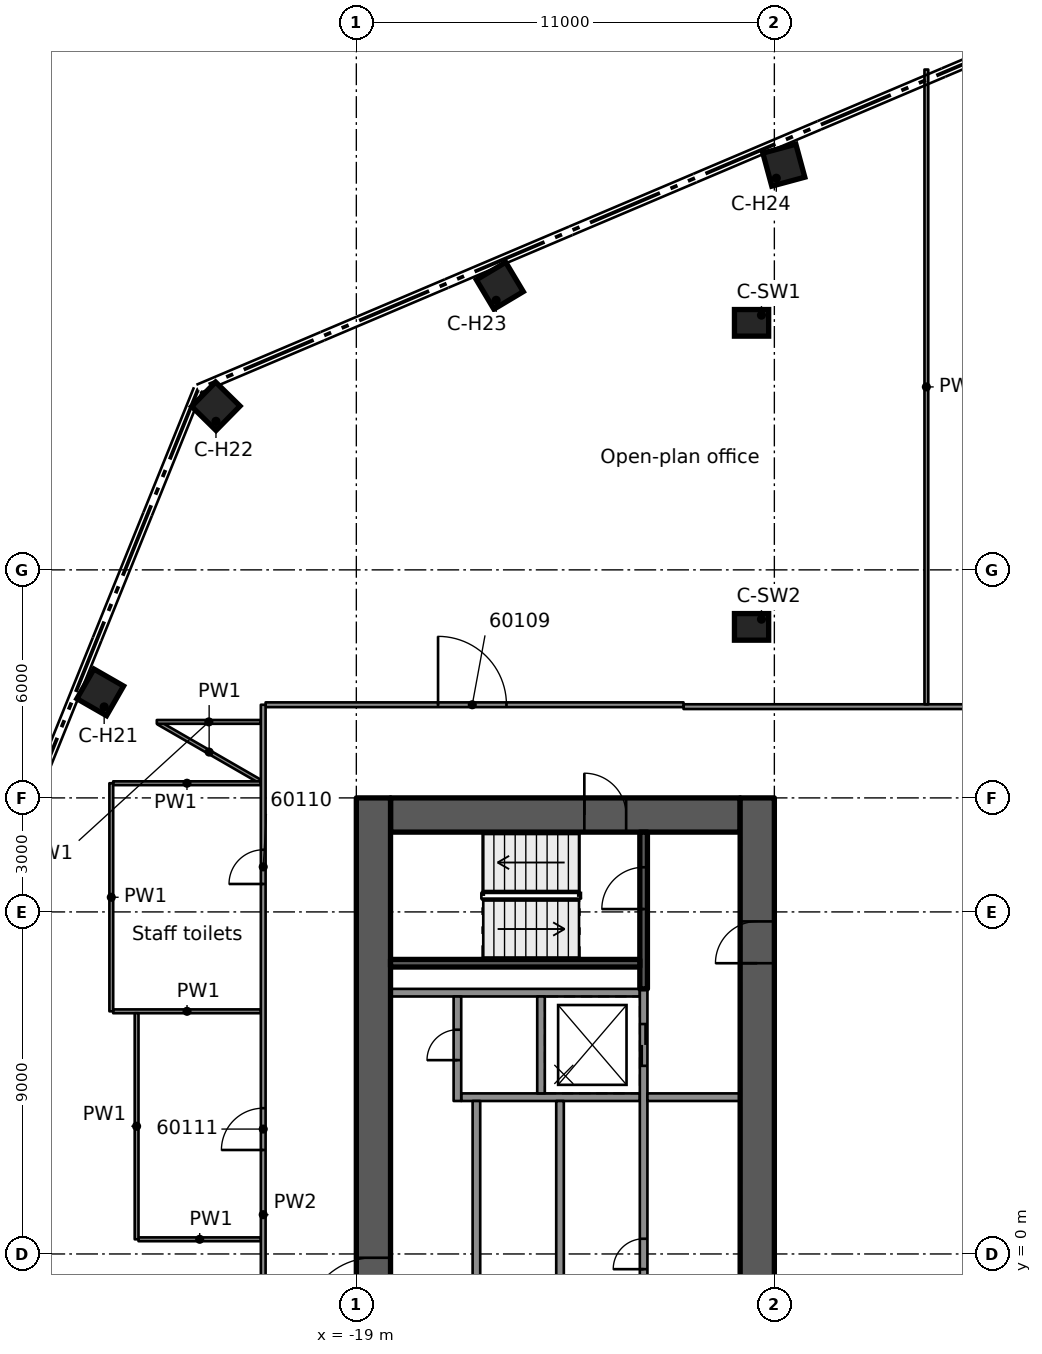
"""IFC4 building model, lengths in metres.
Left out: names, types, materials, properties, quantities, classifications, styles, units other than length and angle.
Written with IfcOpenShell. Run it as: python <this file> out.ifc"""

import sys

from ifc_helpers import new_model, si_unit, direction, frame, frame_2d, origin, origin_2d, place, context, subcontext, project, spatial, rectangle, extrude, element, fill, save


model = new_model("IFC4")
c1 = context("Model", 3, precision=1e-05, world=origin(), true_north=direction((0.0, 1.0)))
c2 = subcontext(c1, "Body", "Model", "MODEL_VIEW")
j1 = project(units=[si_unit("LENGTHUNIT", "METRE"), si_unit("PLANEANGLEUNIT", "RADIAN")], contexts=[c1])
p1 = place(None, origin())
s1 = spatial("IfcSite", under=j1, at=p1, CompositionType="ELEMENT")
p2 = place(p1, origin())
s2 = spatial("IfcBuilding", under=s1, at=p2, CompositionType="ELEMENT")
p3 = place(p2, frame((0.0, 0.0, 292.9)))
s3 = spatial("IfcBuildingStorey", under=s2, at=p3, CompositionType="ELEMENT", Elevation=292.9)
p4 = place(p3, frame((-18.1, 11.55, 0.0), z_axis=(0.0, 0.0, 1.0), x_axis=(1.0, 0.0, 0.0)))
e1 = element("IfcWall", 1, at=p4, inside=s3, PredefinedType="SHEAR", context=c2, shape_type="SweptSolid", body=[
    extrude(rectangle(XDim=9.2, YDim=0.9, at=frame_2d((4.6, 0.0))), origin(), (0.0, 0.0, 1.0), 3.5),
])
p5 = place(p4, frame((5.1, 0.0, 0.0)))
e2 = element("IfcOpeningElement", 2, at=p5, cuts=e1, PredefinedType="OPENING", context=c2, shape_type="SweptSolid", body=[
    extrude(rectangle(XDim=1.1, YDim=2.1, at=frame_2d((0.55, 1.05))), frame((0.0, 0.46, 0.0), z_axis=(0.0, -1.0, 0.0), x_axis=(1.0, 0.0, 0.0)), (0.0, 0.0, 1.0), 0.92),
])
p6 = place(p3, frame((-18.55, -12.0, 0.0), z_axis=(0.0, 0.0, 1.0), x_axis=(0.0, 1.0, 0.0)))
e3 = element("IfcWall", 3, at=p6, inside=s3, PredefinedType="SHEAR", context=c2, shape_type="SweptSolid", body=[
    extrude(rectangle(XDim=24.0, YDim=0.9, at=frame_2d((12.0, 0.0))), origin(), (0.0, 0.0, 1.0), 3.5),
])
p7 = place(p6, frame((10.1, 0.0, 0.0)))
e4 = element("IfcOpeningElement", 4, at=p7, cuts=e3, PredefinedType="OPENING", context=c2, shape_type="SweptSolid", body=[
    extrude(rectangle(XDim=1.8, YDim=2.1, at=frame_2d((0.9, 1.05))), frame((0.0, 0.46, 0.0), z_axis=(0.0, -1.0, 0.0), x_axis=(1.0, 0.0, 0.0)), (0.0, 0.0, 1.0), 0.92),
])
p8 = place(p3, frame((-8.45, -12.0, 0.0), z_axis=(0.0, 0.0, 1.0), x_axis=(0.0, 1.0, 0.0)))
e5 = element("IfcWall", 5, at=p8, inside=s3, PredefinedType="SHEAR", context=c2, shape_type="SweptSolid", body=[
    extrude(rectangle(XDim=24.0, YDim=0.9, at=frame_2d((12.0, 0.0))), origin(), (0.0, 0.0, 1.0), 3.5),
])
p9 = place(p8, frame((9.6, 0.0, 0.0)))
e6 = element("IfcOpeningElement", 6, at=p9, cuts=e5, PredefinedType="OPENING", context=c2, shape_type="SweptSolid", body=[
    extrude(rectangle(XDim=1.8, YDim=2.1, at=frame_2d((0.9, 1.05))), frame((0.0, 0.46, 0.0), z_axis=(0.0, -1.0, 0.0), x_axis=(1.0, 0.0, 0.0)), (0.0, 0.0, 1.0), 0.92),
])
p10 = place(p8, frame((19.65, 0.0, 0.0)))
e7 = element("IfcOpeningElement", 7, at=p10, cuts=e5, PredefinedType="OPENING", context=c2, shape_type="SweptSolid", body=[
    extrude(rectangle(XDim=1.1, YDim=2.1, at=frame_2d((0.55, 1.05))), frame((0.0, 0.46, 0.0), z_axis=(0.0, -1.0, 0.0), x_axis=(1.0, 0.0, 0.0)), (0.0, 0.0, 1.0), 0.92),
])
for number, where, z_axis, x_axis in (
    (8, (-25.739, 14.777, 0.0), (0.0, 0.0, 1.0), (-0.867, 0.498, 0.0)),
    (9, (-22.697, 22.305, 0.0), (0.0, 0.0, 1.0), (-0.713, 0.701, 0.0)),
    (10, (-15.224, 25.477, 0.0), (0.0, 0.0, 1.0), (-0.513, 0.858, 0.0)),
    (11, (-7.751, 28.649, 0.0), (0.0, 0.0, 1.0), (-0.261, 0.965, 0.0)),
):
    element("IfcColumn", number, at=place(p3, frame(where, z_axis=z_axis, x_axis=x_axis)), inside=s3, PredefinedType="COLUMN", context=c2, shape_type="SweptSolid", body=[
        extrude(rectangle(XDim=0.9, YDim=0.9, at=origin_2d()), origin(), (0.0, 0.0, 1.0), 3.5),
    ])
for number, where, z_axis, x_axis in (
    (12, (-8.6, 24.5, 0.0), (0.0, 0.0, 1.0), (1.0, 0.0, 0.0)),
    (13, (-8.6, 16.5, 0.0), (0.0, 0.0, 1.0), (1.0, 0.0, 0.0)),
):
    element("IfcColumn", number, at=place(p3, frame(where, z_axis=z_axis, x_axis=x_axis)), inside=s3, PredefinedType="COLUMN", context=c2, shape_type="SweptSolid", body=[
        extrude(rectangle(XDim=0.9, YDim=0.7, at=origin_2d()), origin(), (0.0, 0.0, 1.0), 3.5),
    ])
p11 = place(p3, frame((-11.54, 6.875, 0.0), z_axis=(0.0, 0.0, 1.0), x_axis=(-1.0, 0.0, 0.0)))
e14 = element("IfcWall", 14, at=p11, inside=s3, PredefinedType="SOLIDWALL", context=c2, shape_type="SweptSolid", body=[
    extrude(rectangle(XDim=6.56, YDim=0.2, at=frame_2d((3.28, 0.0))), origin(), (0.0, 0.0, 1.0), 3.09),
])
p12 = place(p3, frame((-11.54, 4.125, 0.0), z_axis=(0.0, 0.0, 1.0), x_axis=(-1.0, 0.0, 0.0)))
e15 = element("IfcWall", 15, at=p12, inside=s3, PredefinedType="SOLIDWALL", context=c2, shape_type="SweptSolid", body=[
    extrude(rectangle(XDim=4.7, YDim=0.2, at=frame_2d((2.35, 0.0))), origin(), (0.0, 0.0, 1.0), 3.09),
])
p13 = place(p3, frame((-11.44, -6.975, 0.0), z_axis=(0.0, 0.0, 1.0), x_axis=(0.0, 1.0, 0.0)))
e16 = element("IfcWall", 16, at=p13, inside=s3, PredefinedType="SOLIDWALL", context=c2, shape_type="SweptSolid", body=[
    extrude(rectangle(XDim=13.95, YDim=0.2, at=frame_2d((6.975, 0.0))), origin(), (0.0, 0.0, 1.0), 3.09),
])
p14 = place(p13, frame((0.925, 0.0, 0.0)))
e17 = element("IfcOpeningElement", 17, at=p14, cuts=e16, PredefinedType="OPENING", context=c2, shape_type="SweptSolid", body=[
    extrude(rectangle(XDim=1.1, YDim=2.1, at=frame_2d((0.55, 1.05))), frame((0.0, 0.11, 0.0), z_axis=(0.0, -1.0, 0.0), x_axis=(1.0, 0.0, 0.0)), (0.0, 0.0, 1.0), 0.22),
])
p15 = place(p13, frame((3.675, 0.0, 0.0)))
e18 = element("IfcOpeningElement", 18, at=p15, cuts=e16, PredefinedType="OPENING", context=c2, shape_type="SweptSolid", body=[
    extrude(rectangle(XDim=1.1, YDim=2.1, at=frame_2d((0.55, 1.05))), frame((0.0, 0.11, 0.0), z_axis=(0.0, -1.0, 0.0), x_axis=(1.0, 0.0, 0.0)), (0.0, 0.0, 1.0), 0.22),
])
p16 = place(p13, frame((11.925, 0.0, 0.0)))
e19 = element("IfcOpeningElement", 19, at=p16, cuts=e16, PredefinedType="OPENING", context=c2, shape_type="SweptSolid", body=[
    extrude(rectangle(XDim=1.1, YDim=2.1, at=frame_2d((0.55, 1.05))), frame((0.0, 0.11, 0.0), z_axis=(0.0, -1.0, 0.0), x_axis=(1.0, 0.0, 0.0)), (0.0, 0.0, 1.0), 0.22),
])
p17 = place(p13, frame((6.575, 0.0, 0.0)))
e20 = element("IfcOpeningElement", 20, at=p17, cuts=e16, PredefinedType="OPENING", context=c2, shape_type="SweptSolid", body=[
    extrude(rectangle(XDim=0.8, YDim=2.1, at=frame_2d((0.4, 1.05))), frame((0.0, 0.11, 0.0), z_axis=(0.0, -1.0, 0.0), x_axis=(1.0, 0.0, 0.0)), (0.0, 0.0, 1.0), 0.22),
])
p18 = place(p3, frame((-13.64, -4.025, 0.0), z_axis=(0.0, 0.0, 1.0), x_axis=(0.0, 1.0, 0.0)))
e21 = element("IfcWall", 21, at=p18, inside=s3, PredefinedType="SOLIDWALL", context=c2, shape_type="SweptSolid", body=[
    extrude(rectangle(XDim=8.05, YDim=0.2, at=frame_2d((4.025, 0.0))), origin(), (0.0, 0.0, 1.0), 3.09),
])
p19 = place(p3, frame((-14.14, 4.225, 0.0), z_axis=(0.0, 0.0, 1.0), x_axis=(0.0, 1.0, 0.0)))
e22 = element("IfcWall", 22, at=p19, inside=s3, PredefinedType="SOLIDWALL", context=c2, shape_type="SweptSolid", body=[
    extrude(rectangle(XDim=2.55, YDim=0.2, at=frame_2d((1.275, 0.0))), origin(), (0.0, 0.0, 1.0), 3.09),
])
p20 = place(p3, frame((-15.84, -4.025, 0.0), z_axis=(0.0, 0.0, 1.0), x_axis=(0.0, 1.0, 0.0)))
e23 = element("IfcWall", 23, at=p20, inside=s3, PredefinedType="SOLIDWALL", context=c2, shape_type="SweptSolid", body=[
    extrude(rectangle(XDim=8.05, YDim=0.2, at=frame_2d((4.025, 0.0))), origin(), (0.0, 0.0, 1.0), 3.09),
])
p21 = place(p20, frame((0.875, 0.0, 0.0)))
e24 = element("IfcOpeningElement", 24, at=p21, cuts=e23, PredefinedType="OPENING", context=c2, shape_type="SweptSolid", body=[
    extrude(rectangle(XDim=0.8, YDim=2.1, at=frame_2d((0.4, 1.05))), frame((0.0, 0.11, 0.0), z_axis=(0.0, -1.0, 0.0), x_axis=(1.0, 0.0, 0.0)), (0.0, 0.0, 1.0), 0.22),
])
p22 = place(p3, frame((-16.34, 4.025, 0.0), z_axis=(0.0, 0.0, 1.0), x_axis=(0.0, 1.0, 0.0)))
e25 = element("IfcWall", 25, at=p22, inside=s3, PredefinedType="SOLIDWALL", context=c2, shape_type="SweptSolid", body=[
    extrude(rectangle(XDim=2.75, YDim=0.2, at=frame_2d((1.375, 0.0))), origin(), (0.0, 0.0, 1.0), 3.09),
])
p23 = place(p22, frame((1.075, 0.0, 0.0)))
e26 = element("IfcOpeningElement", 26, at=p23, cuts=e25, PredefinedType="OPENING", context=c2, shape_type="SweptSolid", body=[
    extrude(rectangle(XDim=0.8, YDim=2.1, at=frame_2d((0.4, 1.05))), frame((0.0, 0.11, 0.0), z_axis=(0.0, -1.0, 0.0), x_axis=(1.0, 0.0, 0.0)), (0.0, 0.0, 1.0), 0.22),
])
p24 = place(p3, frame((-11.44, 6.975, 0.0), z_axis=(0.0, 0.0, 1.0), x_axis=(0.0, 1.0, 0.0)))
e27 = element("IfcWall", 27, at=p24, inside=s3, PredefinedType="SOLIDWALL", context=c2, shape_type="SweptSolid", body=[
    extrude(rectangle(XDim=4.125, YDim=0.2, at=frame_2d((2.062, 0.0))), origin(), (0.0, 0.0, 1.0), 3.09),
])
p25 = place(p24, frame((2.1, 0.0, 0.0)))
e28 = element("IfcOpeningElement", 28, at=p25, cuts=e27, PredefinedType="OPENING", context=c2, shape_type="SweptSolid", body=[
    extrude(rectangle(XDim=1.1, YDim=2.1, at=frame_2d((0.55, 1.05))), frame((0.0, 0.11, 0.0), z_axis=(0.0, -1.0, 0.0), x_axis=(1.0, 0.0, 0.0)), (0.0, 0.0, 1.0), 0.22),
])
p26 = place(p3, frame((-11.54, 7.65, 0.0), z_axis=(0.0, 0.0, 1.0), x_axis=(-1.0, 0.0, 0.0)))
e29 = element("IfcWall", 29, at=p26, inside=s3, PredefinedType="SOLIDWALL", context=c2, shape_type="SweptSolid", body=[
    extrude(rectangle(XDim=6.56, YDim=0.2, at=frame_2d((3.28, 0.0))), origin(), (0.0, 0.0, 1.0), 3.09),
])
p27 = place(p3, frame((-8.9, 4.125, 0.0), z_axis=(0.0, 0.0, 1.0), x_axis=(-1.0, 0.0, 0.0)))
e30 = element("IfcWall", 30, at=p27, inside=s3, PredefinedType="PARTITIONING", context=c2, shape_type="SweptSolid", body=[
    extrude(rectangle(XDim=2.44, YDim=0.2, at=frame_2d((1.22, 0.0))), origin(), (0.0, 0.0, 1.0), 3.09),
])
p28 = place(p3, frame((-24.206, 13.975, 0.0), z_axis=(0.0, 0.0, 1.0), x_axis=(0.866185586049, -0.49972245349, 0.0)))
e31 = element("IfcWall", 31, at=p28, inside=s3, PredefinedType="PARTITIONING", context=c2, shape_type="SweptSolid", body=[
    extrude(rectangle(XDim=3.078, YDim=0.1, at=frame_2d((1.539, 0.0))), origin(), (0.0, 0.0, 1.0), 3.08),
])
p29 = place(p3, frame((-24.732, 0.386, 0.0), z_axis=(0.0, 0.0, 1.0), x_axis=(1.0, 0.0, 0.0)))
e32 = element("IfcWall", 32, at=p29, inside=s3, PredefinedType="PARTITIONING", context=c2, shape_type="SweptSolid", body=[
    extrude(rectangle(XDim=3.22, YDim=0.1, at=frame_2d((1.61, 0.0))), origin(), (0.0, 0.0, 1.0), 3.08),
])
p30 = place(p3, frame((-25.398, 6.385, 0.0), z_axis=(0.0, 0.0, 1.0), x_axis=(1.0, 0.0, 0.0)))
e33 = element("IfcWall", 33, at=p30, inside=s3, PredefinedType="PARTITIONING", context=c2, shape_type="SweptSolid", body=[
    extrude(rectangle(XDim=3.886, YDim=0.1, at=frame_2d((1.943, 0.0))), origin(), (0.0, 0.0, 1.0), 3.08),
])
p31 = place(p3, frame((-25.398, 12.386, 0.0), z_axis=(0.0, 0.0, 1.0), x_axis=(1.0, 0.0, 0.0)))
e34 = element("IfcWall", 34, at=p31, inside=s3, PredefinedType="PARTITIONING", context=c2, shape_type="SweptSolid", body=[
    extrude(rectangle(XDim=3.883, YDim=0.1, at=frame_2d((1.941, 0.0))), origin(), (0.0, 0.0, 1.0), 3.08),
])
p32 = place(p3, frame((-24.25, 14.0, 0.0), z_axis=(0.0, 0.0, 1.0), x_axis=(1.0, 0.0, 0.0)))
e35 = element("IfcWall", 35, at=p32, inside=s3, PredefinedType="PARTITIONING", context=c2, shape_type="SweptSolid", body=[
    extrude(rectangle(XDim=2.738, YDim=0.1, at=frame_2d((1.369, 0.0))), origin(), (0.0, 0.0, 1.0), 3.08),
])
p33 = place(p3, frame((-10.39, 14.401, 0.0), z_axis=(0.0, 0.0, 1.0), x_axis=(1.0, 0.0, 0.0)))
e36 = element("IfcWall", 36, at=p33, inside=s3, PredefinedType="PARTITIONING", context=c2, shape_type="SweptSolid", body=[
    extrude(rectangle(XDim=20.739, YDim=0.125, at=frame_2d((10.37, 0.0))), origin(), (0.0, 0.0, 1.0), 3.08),
])
p34 = place(p33, frame((9.49, 0.0, 0.0)))
e37 = element("IfcOpeningElement", 37, at=p34, cuts=e36, PredefinedType="OPENING", context=c2, shape_type="SweptSolid", body=[
    extrude(rectangle(XDim=1.8, YDim=2.1, at=frame_2d((0.9, 1.05))), frame((0.0, 0.073, 0.0), z_axis=(0.0, -1.0, 0.0), x_axis=(1.0, 0.0, 0.0)), (0.0, 0.0, 1.0), 0.145),
])
p35 = place(p3, frame((-21.387, 14.451, 0.0), z_axis=(0.0, 0.0, 1.0), x_axis=(1.0, 0.0, 0.0)))
e38 = element("IfcWall", 38, at=p35, inside=s3, PredefinedType="PARTITIONING", context=c2, shape_type="SweptSolid", body=[
    extrude(rectangle(XDim=10.996, YDim=0.125, at=frame_2d((5.498, 0.0))), origin(), (0.0, 0.0, 1.0), 3.08),
])
p36 = place(p35, frame((4.538, 0.0, 0.0)))
e39 = element("IfcOpeningElement", 39, at=p36, cuts=e38, PredefinedType="OPENING", context=c2, shape_type="SweptSolid", body=[
    extrude(rectangle(XDim=1.8, YDim=2.1, at=frame_2d((0.9, 1.05))), frame((0.0, 0.073, 0.0), z_axis=(0.0, -1.0, 0.0), x_axis=(1.0, 0.0, 0.0)), (0.0, 0.0, 1.0), 0.145),
])
p37 = place(p3, frame((-4.0, 14.463, 0.0), z_axis=(0.0, 0.0, 1.0), x_axis=(0.0, 1.0, 0.0)))
e40 = element("IfcWall", 40, at=p37, inside=s3, PredefinedType="PARTITIONING", context=c2, shape_type="SweptSolid", body=[
    extrude(rectangle(XDim=16.702, YDim=0.1, at=frame_2d((8.351, 0.0))), origin(), (0.0, 0.0, 1.0), 3.08),
])
p38 = place(p3, frame((-21.45, -12.384, 0.0), z_axis=(0.0, 0.0, 1.0), x_axis=(0.0, 1.0, 0.0)))
e41 = element("IfcWall", 41, at=p38, inside=s3, PredefinedType="PARTITIONING", context=c2, shape_type="SweptSolid", body=[
    extrude(rectangle(XDim=26.835, YDim=0.125, at=frame_2d((13.417, 0.0))), origin(), (0.0, 0.0, 1.0), 3.08),
])
p39 = place(p38, frame((5.85, 0.0, 0.0)))
e42 = element("IfcOpeningElement", 42, at=p39, cuts=e41, PredefinedType="OPENING", context=c2, shape_type="SweptSolid", body=[
    extrude(rectangle(XDim=0.9, YDim=2.1, at=frame_2d((0.45, 1.05))), frame((0.0, 0.073, 0.0), z_axis=(0.0, -1.0, 0.0), x_axis=(1.0, 0.0, 0.0)), (0.0, 0.0, 1.0), 0.145),
])
p40 = place(p38, frame((22.119, 0.0, 0.0)))
e43 = element("IfcOpeningElement", 43, at=p40, cuts=e41, PredefinedType="OPENING", context=c2, shape_type="SweptSolid", body=[
    extrude(rectangle(XDim=0.9, YDim=2.1, at=frame_2d((0.45, 1.05))), frame((0.0, 0.073, 0.0), z_axis=(0.0, -1.0, 0.0), x_axis=(1.0, 0.0, 0.0)), (0.0, 0.0, 1.0), 0.145),
])
p41 = place(p38, frame((15.12, 0.0, 0.0)))
e44 = element("IfcOpeningElement", 44, at=p41, cuts=e41, PredefinedType="OPENING", context=c2, shape_type="SweptSolid", body=[
    extrude(rectangle(XDim=1.1, YDim=2.1, at=frame_2d((0.55, 1.05))), frame((0.0, 0.073, 0.0), z_axis=(0.0, -1.0, 0.0), x_axis=(1.0, 0.0, 0.0)), (0.0, 0.0, 1.0), 0.145),
])
p42 = place(p3, frame((-24.782, 0.386, 0.0), z_axis=(0.0, 0.0, 1.0), x_axis=(0.0, 1.0, 0.0)))
e45 = element("IfcWall", 45, at=p42, inside=s3, PredefinedType="PARTITIONING", context=c2, shape_type="SweptSolid", body=[
    extrude(rectangle(XDim=5.949, YDim=0.1, at=frame_2d((2.975, 0.0))), origin(), (0.0, 0.0, 1.0), 3.08),
])
p43 = place(p3, frame((-25.448, 6.385, 0.0), z_axis=(0.0, 0.0, 1.0), x_axis=(0.0, 1.0, 0.0)))
e46 = element("IfcWall", 46, at=p43, inside=s3, PredefinedType="PARTITIONING", context=c2, shape_type="SweptSolid", body=[
    extrude(rectangle(XDim=6.001, YDim=0.1, at=frame_2d((3.0, 0.0))), origin(), (0.0, 0.0, 1.0), 3.08),
])
p44 = place(p16, origin())
e47 = element("IfcDoor", 47, at=p44, inside=s3, OperationType="DOUBLE_DOOR_SLIDING", PredefinedType="DOOR", context=c2, shape_type="SweptSolid", body=[
    extrude(rectangle(XDim=1.1, YDim=2.1, at=frame_2d((0.55, 1.05))), frame((0.0, 0.025, 0.0), z_axis=(0.0, -1.0, 0.0), x_axis=(1.0, 0.0, 0.0)), (0.0, 0.0, 1.0), 0.05),
])
fill(e19, e47)
p45 = place(p17, origin())
e48 = element("IfcDoor", 48, at=p45, inside=s3, OperationType="SINGLE_SWING_LEFT", PredefinedType="DOOR", context=c2, shape_type="SweptSolid", body=[
    extrude(rectangle(XDim=0.8, YDim=2.1, at=frame_2d((0.4, 1.05))), frame((0.0, 0.025, 0.0), z_axis=(0.0, -1.0, 0.0), x_axis=(1.0, 0.0, 0.0)), (0.0, 0.0, 1.0), 0.05),
])
fill(e20, e48)
p46 = place(p23, origin())
e49 = element("IfcDoor", 49, at=p46, inside=s3, OperationType="SINGLE_SWING_LEFT", PredefinedType="DOOR", context=c2, shape_type="SweptSolid", body=[
    extrude(rectangle(XDim=0.8, YDim=2.1, at=frame_2d((0.4, 1.05))), frame((0.0, 0.025, 0.0), z_axis=(0.0, -1.0, 0.0), x_axis=(1.0, 0.0, 0.0)), (0.0, 0.0, 1.0), 0.05),
])
fill(e26, e49)
p47 = place(p7, origin())
e50 = element("IfcDoor", 50, at=p47, inside=s3, OperationType="SINGLE_SWING_LEFT", PredefinedType="DOOR", context=c2, shape_type="SweptSolid", body=[
    extrude(rectangle(XDim=1.8, YDim=2.1, at=frame_2d((0.9, 1.05))), frame((0.0, 0.025, 0.0), z_axis=(0.0, -1.0, 0.0), x_axis=(1.0, 0.0, 0.0)), (0.0, 0.0, 1.0), 0.05),
])
fill(e4, e50)
p48 = place(p10, origin())
e51 = element("IfcDoor", 51, at=p48, inside=s3, OperationType="SINGLE_SWING_RIGHT", PredefinedType="DOOR", context=c2, shape_type="SweptSolid", body=[
    extrude(rectangle(XDim=1.1, YDim=2.1, at=frame_2d((0.55, 1.05))), frame((0.0, 0.025, 0.0), z_axis=(0.0, -1.0, 0.0), x_axis=(1.0, 0.0, 0.0)), (0.0, 0.0, 1.0), 0.05),
])
fill(e7, e51)
p49 = place(p5, origin())
e52 = element("IfcDoor", 52, at=p49, inside=s3, OperationType="SINGLE_SWING_RIGHT", PredefinedType="DOOR", context=c2, shape_type="SweptSolid", body=[
    extrude(rectangle(XDim=1.1, YDim=2.1, at=frame_2d((0.55, 1.05))), frame((0.0, 0.025, 0.0), z_axis=(0.0, -1.0, 0.0), x_axis=(1.0, 0.0, 0.0)), (0.0, 0.0, 1.0), 0.05),
])
fill(e2, e52)
p50 = place(p25, origin())
e53 = element("IfcDoor", 53, at=p50, inside=s3, OperationType="SINGLE_SWING_RIGHT", PredefinedType="DOOR", context=c2, shape_type="SweptSolid", body=[
    extrude(rectangle(XDim=1.1, YDim=2.1, at=frame_2d((0.55, 1.05))), frame((0.0, 0.025, 0.0), z_axis=(0.0, -1.0, 0.0), x_axis=(1.0, 0.0, 0.0)), (0.0, 0.0, 1.0), 0.05),
])
fill(e28, e53)
p51 = place(p36, origin())
e54 = element("IfcDoor", 54, at=p51, inside=s3, OperationType="DOUBLE_DOOR_SINGLE_SWING", PredefinedType="DOOR", context=c2, shape_type="SweptSolid", body=[
    extrude(rectangle(XDim=1.8, YDim=2.1, at=frame_2d((0.9, 1.05))), frame((0.0, 0.025, 0.0), z_axis=(0.0, -1.0, 0.0), x_axis=(1.0, 0.0, 0.0)), (0.0, 0.0, 1.0), 0.05),
])
fill(e39, e54)
p52 = place(p40, origin())
e55 = element("IfcDoor", 55, at=p52, inside=s3, OperationType="SINGLE_SWING_RIGHT", PredefinedType="DOOR", context=c2, shape_type="SweptSolid", body=[
    extrude(rectangle(XDim=0.9, YDim=2.1, at=frame_2d((0.45, 1.05))), frame((0.0, 0.025, 0.0), z_axis=(0.0, -1.0, 0.0), x_axis=(1.0, 0.0, 0.0)), (0.0, 0.0, 1.0), 0.05),
])
fill(e43, e55)
p53 = place(p41, origin())
e56 = element("IfcDoor", 56, at=p53, inside=s3, OperationType="SINGLE_SWING_RIGHT", PredefinedType="DOOR", context=c2, shape_type="SweptSolid", body=[
    extrude(rectangle(XDim=1.1, YDim=2.1, at=frame_2d((0.55, 1.05))), frame((0.0, 0.025, 0.0), z_axis=(0.0, -1.0, 0.0), x_axis=(1.0, 0.0, 0.0)), (0.0, 0.0, 1.0), 0.05),
])
fill(e44, e56)
save(model, sys.argv[1])
